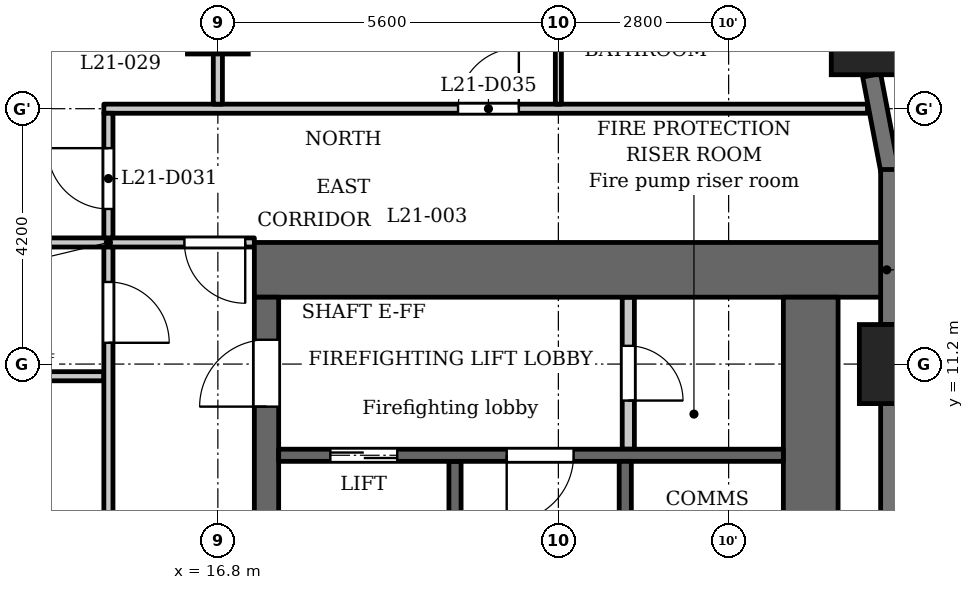
"""IFC4 building model, lengths in metres.
Left out: names, types, materials, properties, quantities, classifications, styles, units other than length and angle.
Written with IfcOpenShell. Run it as: python <this file> out.ifc"""

import sys

from ifc_helpers import new_model, si_unit, direction, frame, frame_2d, origin, origin_2d, place, context, subcontext, project, spatial, rectangle, extrude, element, fill, save


model = new_model("IFC4")
c1 = context("Model", 3, precision=1e-05, world=origin(), true_north=direction((0.0, 1.0)))
c2 = subcontext(c1, "Body", "Model", "MODEL_VIEW")
j1 = project(units=[si_unit("LENGTHUNIT", "METRE"), si_unit("PLANEANGLEUNIT", "RADIAN")], contexts=[c1])
p1 = place(None, origin())
s1 = spatial("IfcSite", under=j1, at=p1, CompositionType="ELEMENT")
p2 = place(p1, origin())
s2 = spatial("IfcBuilding", under=s1, at=p2, CompositionType="ELEMENT")
p3 = place(p2, frame((0.0, 0.0, 86.8)))
s3 = spatial("IfcBuildingStorey", under=s2, at=p3, CompositionType="ELEMENT", Elevation=86.8)
for number, where, z_axis, x_axis in (
    (1, (28.0, 11.2, 0.0), (0.0, 0.0, 1.0), (1.0, 0.0, 0.0)),
    (2, (27.538, 16.609, 0.0), (0.0, 0.0, 1.0), (1.0, 0.0, 0.0)),
):
    element("IfcColumn", number, at=place(p3, frame(where, z_axis=z_axis, x_axis=x_axis)), inside=s3, PredefinedType="COLUMN", context=c2, shape_type="SweptSolid", body=[
        extrude(rectangle(XDim=1.3, YDim=1.3, at=origin_2d()), origin(), (0.0, 0.0, 1.0), 3.5),
    ])
p4 = place(p3, frame((16.8, 16.8, 0.0), z_axis=(0.0, 0.0, 1.0), x_axis=(1.0, 0.0, 0.0)))
e3 = element("IfcColumn", 3, at=p4, inside=s3, PredefinedType="COLUMN", context=c2, shape_type="SweptSolid", body=[
    extrude(rectangle(XDim=1.0, YDim=1.0, at=origin_2d()), origin(), (0.0, 0.0, 1.0), 3.5),
])
p5 = place(p3, frame((27.85, 6.25, 0.0), z_axis=(0.0, 0.0, 1.0), x_axis=(0.0, 1.0, 0.0)))
e4 = element("IfcWall", 4, at=p5, inside=s3, PredefinedType="SOLIDWALL", context=c2, shape_type="SweptSolid", body=[
    extrude(rectangle(XDim=4.3, YDim=0.3, at=frame_2d((2.15, 0.0))), origin(), (0.0, 0.0, 1.0), 2.4),
])
p6 = place(p3, frame((27.85, 11.85, 0.0), z_axis=(0.0, 0.0, 1.0), x_axis=(0.0, 1.0, 0.0)))
e5 = element("IfcWall", 5, at=p6, inside=s3, PredefinedType="SOLIDWALL", context=c2, shape_type="SweptSolid", body=[
    extrude(rectangle(XDim=2.55, YDim=0.3, at=frame_2d((1.275, 0.0))), origin(), (0.0, 0.0, 1.0), 2.4),
])
p7 = place(p3, frame((27.853, 14.372, 0.0), z_axis=(0.0, 0.0, 1.0), x_axis=(-0.187279751651, 0.982306619453, 0.0)))
e6 = element("IfcWall", 6, at=p7, inside=s3, PredefinedType="SOLIDWALL", context=c2, shape_type="SweptSolid", body=[
    extrude(rectangle(XDim=1.606, YDim=0.3, at=frame_2d((0.803, 0.0))), origin(), (0.0, 0.0, 1.0), 2.4),
])
p8 = place(p3, frame((20.7, 2.6, 0.0), z_axis=(0.0, 0.0, 1.0), x_axis=(0.0, 1.0, 0.0)))
e7 = element("IfcWall", 7, at=p8, inside=s3, PredefinedType="SHEAR", context=c2, shape_type="SweptSolid", body=[
    extrude(rectangle(XDim=7.0, YDim=0.2, at=frame_2d((3.5, 0.0))), origin(), (0.0, 0.0, 1.0), 3.2),
])
p9 = place(p3, frame((17.4, 12.75, 0.0), z_axis=(0.0, 0.0, 1.0), x_axis=(1.0, 0.0, 0.0)))
e8 = element("IfcWall", 8, at=p9, inside=s3, PredefinedType="SHEAR", context=c2, shape_type="SweptSolid", body=[
    extrude(rectangle(XDim=10.4, YDim=0.9, at=frame_2d((5.2, 0.0))), origin(), (0.0, 0.0, 1.0), 3.2),
])
p10 = place(p3, frame((17.6, -12.3, 0.0), z_axis=(0.0, 0.0, 1.0), x_axis=(0.0, 1.0, 0.0)))
e9 = element("IfcWall", 9, at=p10, inside=s3, PredefinedType="SHEAR", context=c2, shape_type="SweptSolid", body=[
    extrude(rectangle(XDim=24.6, YDim=0.4, at=frame_2d((12.3, 0.0))), origin(), (0.0, 0.0, 1.0), 3.2),
])
p11 = place(p10, frame((6.0, 0.0, 0.0)))
e10 = element("IfcOpeningElement", 10, at=p11, cuts=e9, PredefinedType="OPENING", context=c2, shape_type="SweptSolid", body=[
    extrude(rectangle(XDim=1.1, YDim=2.1, at=frame_2d((0.55, 1.05))), frame((0.0, 0.21, 0.0), z_axis=(0.0, -1.0, 0.0), x_axis=(1.0, 0.0, 0.0)), (0.0, 0.0, 1.0), 0.42),
])
p12 = place(p10, frame((8.4, 0.0, 0.0)))
e11 = element("IfcOpeningElement", 11, at=p12, cuts=e9, PredefinedType="OPENING", context=c2, shape_type="SweptSolid", body=[
    extrude(rectangle(XDim=1.1, YDim=2.1, at=frame_2d((0.55, 1.05))), frame((0.0, 0.21, 0.0), z_axis=(0.0, -1.0, 0.0), x_axis=(1.0, 0.0, 0.0)), (0.0, 0.0, 1.0), 0.42),
])
p13 = place(p10, frame((10.8, 0.0, 0.0)))
e12 = element("IfcOpeningElement", 12, at=p13, cuts=e9, PredefinedType="OPENING", context=c2, shape_type="SweptSolid", body=[
    extrude(rectangle(XDim=1.1, YDim=2.1, at=frame_2d((0.55, 1.05))), frame((0.0, 0.21, 0.0), z_axis=(0.0, -1.0, 0.0), x_axis=(1.0, 0.0, 0.0)), (0.0, 0.0, 1.0), 0.42),
])
p14 = place(p10, frame((16.75, 0.0, 0.0)))
e13 = element("IfcOpeningElement", 13, at=p14, cuts=e9, PredefinedType="OPENING", context=c2, shape_type="SweptSolid", body=[
    extrude(rectangle(XDim=0.9, YDim=2.1, at=frame_2d((0.45, 1.05))), frame((0.0, 0.21, 0.0), z_axis=(0.0, -1.0, 0.0), x_axis=(1.0, 0.0, 0.0)), (0.0, 0.0, 1.0), 0.42),
])
p15 = place(p10, frame((22.8, 0.0, 0.0)))
e14 = element("IfcOpeningElement", 14, at=p15, cuts=e9, PredefinedType="OPENING", context=c2, shape_type="SweptSolid", body=[
    extrude(rectangle(XDim=1.1, YDim=2.1, at=frame_2d((0.55, 1.05))), frame((0.0, 0.21, 0.0), z_axis=(0.0, -1.0, 0.0), x_axis=(1.0, 0.0, 0.0)), (0.0, 0.0, 1.0), 0.42),
])
p16 = place(p10, frame((0.7, 0.0, 0.0)))
e15 = element("IfcOpeningElement", 15, at=p16, cuts=e9, PredefinedType="OPENING", context=c2, shape_type="SweptSolid", body=[
    extrude(rectangle(XDim=1.1, YDim=2.1, at=frame_2d((0.55, 1.05))), frame((0.0, 0.21, 0.0), z_axis=(0.0, -1.0, 0.0), x_axis=(1.0, 0.0, 0.0)), (0.0, 0.0, 1.0), 0.42),
])
p17 = place(p10, frame((12.775, 0.0, 0.0)))
e16 = element("IfcOpeningElement", 16, at=p17, cuts=e9, PredefinedType="OPENING", context=c2, shape_type="SweptSolid", body=[
    extrude(rectangle(XDim=1.8, YDim=2.1, at=frame_2d((0.9, 1.05))), frame((0.0, 0.21, 0.0), z_axis=(0.0, -1.0, 0.0), x_axis=(1.0, 0.0, 0.0)), (0.0, 0.0, 1.0), 0.42),
])
p18 = place(p3, frame((26.55, -12.3, 0.0), z_axis=(0.0, 0.0, 1.0), x_axis=(0.0, 1.0, 0.0)))
e17 = element("IfcWall", 17, at=p18, inside=s3, PredefinedType="SHEAR", context=c2, shape_type="SweptSolid", body=[
    extrude(rectangle(XDim=24.6, YDim=0.9, at=frame_2d((12.3, 0.0))), origin(), (0.0, 0.0, 1.0), 3.2),
])
p19 = place(p3, frame((23.55, 9.8, 0.0), z_axis=(0.0, 0.0, 1.0), x_axis=(0.0, 1.0, 0.0)))
e18 = element("IfcWall", 18, at=p19, inside=s3, PredefinedType="PARTITIONING", context=c2, shape_type="SweptSolid", body=[
    extrude(rectangle(XDim=2.5, YDim=0.2, at=frame_2d((1.25, 0.0))), origin(), (0.0, 0.0, 1.0), 3.2),
])
p20 = place(p19, frame((0.8, 0.0, 0.0)))
e19 = element("IfcOpeningElement", 19, at=p20, cuts=e18, PredefinedType="OPENING", context=c2, shape_type="SweptSolid", body=[
    extrude(rectangle(XDim=0.9, YDim=2.1, at=frame_2d((0.45, 1.05))), frame((0.0, 0.11, 0.0), z_axis=(0.0, -1.0, 0.0), x_axis=(1.0, 0.0, 0.0)), (0.0, 0.0, 1.0), 0.22),
])
p21 = place(p3, frame((17.8, 9.7, 0.0), z_axis=(0.0, 0.0, 1.0), x_axis=(1.0, 0.0, 0.0)))
e20 = element("IfcWall", 20, at=p21, inside=s3, PredefinedType="SHEAR", context=c2, shape_type="SweptSolid", body=[
    extrude(rectangle(XDim=8.3, YDim=0.2, at=frame_2d((4.15, 0.0))), origin(), (0.0, 0.0, 1.0), 3.2),
])
p22 = place(p21, frame((0.85, 0.0, 0.0)))
e21 = element("IfcOpeningElement", 21, at=p22, cuts=e20, PredefinedType="OPENING", context=c2, shape_type="SweptSolid", body=[
    extrude(rectangle(XDim=1.1, YDim=2.1, at=frame_2d((0.55, 1.05))), frame((0.0, 0.11, 0.0), z_axis=(0.0, -1.0, 0.0), x_axis=(1.0, 0.0, 0.0)), (0.0, 0.0, 1.0), 0.22),
])
p23 = place(p21, frame((3.75, 0.0, 0.0)))
e22 = element("IfcOpeningElement", 22, at=p23, cuts=e20, PredefinedType="OPENING", context=c2, shape_type="SweptSolid", body=[
    extrude(rectangle(XDim=1.1, YDim=2.1, at=frame_2d((0.55, 1.05))), frame((0.0, 0.11, 0.0), z_axis=(0.0, -1.0, 0.0), x_axis=(1.0, 0.0, 0.0)), (0.0, 0.0, 1.0), 0.22),
])
p24 = place(p3, frame((23.5, 2.6, 0.0), z_axis=(0.0, 0.0, 1.0), x_axis=(0.0, 1.0, 0.0)))
e23 = element("IfcWall", 23, at=p24, inside=s3, PredefinedType="SHEAR", context=c2, shape_type="SweptSolid", body=[
    extrude(rectangle(XDim=7.0, YDim=0.2, at=frame_2d((3.5, 0.0))), origin(), (0.0, 0.0, 1.0), 3.2),
])
p25 = place(p3, frame((-14.925, 11.0, 0.0), z_axis=(0.0, 0.0, 1.0), x_axis=(1.0, 0.0, 0.0)))
e24 = element("IfcWall", 24, at=p25, inside=s3, PredefinedType="PARTITIONING", context=c2, shape_type="SweptSolid", body=[
    extrude(rectangle(XDim=29.85, YDim=0.15, at=frame_2d((14.925, 0.0))), origin(), (0.0, 0.0, 1.0), 3.2),
])
p26 = place(p25, frame((1.076, 0.0, 0.0)))
e25 = element("IfcOpeningElement", 25, at=p26, cuts=e24, PredefinedType="OPENING", context=c2, shape_type="SweptSolid", body=[
    extrude(rectangle(XDim=1.0, YDim=2.1, at=frame_2d((0.5, 1.05))), frame((0.0, 0.085, 0.0), z_axis=(0.0, -1.0, 0.0), x_axis=(1.0, 0.0, 0.0)), (0.0, 0.0, 1.0), 0.17),
])
p27 = place(p25, frame((7.625, 0.0, 0.0)))
e26 = element("IfcOpeningElement", 26, at=p27, cuts=e24, PredefinedType="OPENING", context=c2, shape_type="SweptSolid", body=[
    extrude(rectangle(XDim=1.0, YDim=2.1, at=frame_2d((0.5, 1.05))), frame((0.0, 0.085, 0.0), z_axis=(0.0, -1.0, 0.0), x_axis=(1.0, 0.0, 0.0)), (0.0, 0.0, 1.0), 0.17),
])
p28 = place(p25, frame((9.975, 0.0, 0.0)))
e27 = element("IfcOpeningElement", 27, at=p28, cuts=e24, PredefinedType="OPENING", context=c2, shape_type="SweptSolid", body=[
    extrude(rectangle(XDim=1.0, YDim=2.1, at=frame_2d((0.5, 1.05))), frame((0.0, 0.085, 0.0), z_axis=(0.0, -1.0, 0.0), x_axis=(1.0, 0.0, 0.0)), (0.0, 0.0, 1.0), 0.17),
])
p29 = place(p25, frame((18.825, 0.0, 0.0)))
e28 = element("IfcOpeningElement", 28, at=p29, cuts=e24, PredefinedType="OPENING", context=c2, shape_type="SweptSolid", body=[
    extrude(rectangle(XDim=1.0, YDim=2.1, at=frame_2d((0.5, 1.05))), frame((0.0, 0.085, 0.0), z_axis=(0.0, -1.0, 0.0), x_axis=(1.0, 0.0, 0.0)), (0.0, 0.0, 1.0), 0.17),
])
p30 = place(p25, frame((21.175, 0.0, 0.0)))
e29 = element("IfcOpeningElement", 29, at=p30, cuts=e24, PredefinedType="OPENING", context=c2, shape_type="SweptSolid", body=[
    extrude(rectangle(XDim=1.0, YDim=2.1, at=frame_2d((0.5, 1.05))), frame((0.0, 0.085, 0.0), z_axis=(0.0, -1.0, 0.0), x_axis=(1.0, 0.0, 0.0)), (0.0, 0.0, 1.0), 0.17),
])
p31 = place(p25, frame((27.775, 0.0, 0.0)))
e30 = element("IfcOpeningElement", 30, at=p31, cuts=e24, PredefinedType="OPENING", context=c2, shape_type="SweptSolid", body=[
    extrude(rectangle(XDim=1.0, YDim=2.1, at=frame_2d((0.5, 1.05))), frame((0.0, 0.085, 0.0), z_axis=(0.0, -1.0, 0.0), x_axis=(1.0, 0.0, 0.0)), (0.0, 0.0, 1.0), 0.17),
])
p32 = place(p3, frame((-17.4, 13.2, 0.0), z_axis=(0.0, 0.0, 1.0), x_axis=(1.0, 0.0, 0.0)))
e31 = element("IfcWall", 31, at=p32, inside=s3, PredefinedType="PARTITIONING", context=c2, shape_type="SweptSolid", body=[
    extrude(rectangle(XDim=34.8, YDim=0.15, at=frame_2d((17.4, 0.0))), origin(), (0.0, 0.0, 1.0), 3.2),
])
p33 = place(p32, frame((0.25, 0.0, 0.0)))
e32 = element("IfcOpeningElement", 32, at=p33, cuts=e31, PredefinedType="OPENING", context=c2, shape_type="SweptSolid", body=[
    extrude(rectangle(XDim=1.0, YDim=2.1, at=frame_2d((0.5, 1.05))), frame((0.0, 0.085, 0.0), z_axis=(0.0, -1.0, 0.0), x_axis=(1.0, 0.0, 0.0)), (0.0, 0.0, 1.0), 0.17),
])
p34 = place(p32, frame((33.65, 0.0, 0.0)))
e33 = element("IfcOpeningElement", 33, at=p34, cuts=e31, PredefinedType="OPENING", context=c2, shape_type="SweptSolid", body=[
    extrude(rectangle(XDim=1.0, YDim=2.1, at=frame_2d((0.5, 1.05))), frame((0.0, 0.085, 0.0), z_axis=(0.0, -1.0, 0.0), x_axis=(1.0, 0.0, 0.0)), (0.0, 0.0, 1.0), 0.17),
])
p35 = place(p32, frame((15.75, 0.0, 0.0)))
e34 = element("IfcOpeningElement", 34, at=p35, cuts=e31, PredefinedType="OPENING", context=c2, shape_type="SweptSolid", body=[
    extrude(rectangle(XDim=1.0, YDim=2.1, at=frame_2d((0.5, 1.05))), frame((0.0, 0.085, 0.0), z_axis=(0.0, -1.0, 0.0), x_axis=(1.0, 0.0, 0.0)), (0.0, 0.0, 1.0), 0.17),
])
p36 = place(p32, frame((21.35, 0.0, 0.0)))
e35 = element("IfcOpeningElement", 35, at=p36, cuts=e31, PredefinedType="OPENING", context=c2, shape_type="SweptSolid", body=[
    extrude(rectangle(XDim=1.0, YDim=2.1, at=frame_2d((0.5, 1.05))), frame((0.0, 0.085, 0.0), z_axis=(0.0, -1.0, 0.0), x_axis=(1.0, 0.0, 0.0)), (0.0, 0.0, 1.0), 0.17),
])
p37 = place(p3, frame((14.925, 15.4, 0.0), z_axis=(0.0, 0.0, 1.0), x_axis=(1.0, 0.0, 0.0)))
e36 = element("IfcWall", 36, at=p37, inside=s3, PredefinedType="PARTITIONING", context=c2, shape_type="SweptSolid", body=[
    extrude(rectangle(XDim=12.559, YDim=0.15, at=frame_2d((6.279, 0.0))), origin(), (0.0, 0.0, 1.0), 3.2),
])
p38 = place(p37, frame((5.825, 0.0, 0.0)))
e37 = element("IfcOpeningElement", 37, at=p38, cuts=e36, PredefinedType="OPENING", context=c2, shape_type="SweptSolid", body=[
    extrude(rectangle(XDim=1.0, YDim=2.1, at=frame_2d((0.5, 1.05))), frame((0.0, 0.085, 0.0), z_axis=(0.0, -1.0, 0.0), x_axis=(1.0, 0.0, 0.0)), (0.0, 0.0, 1.0), 0.17),
])
p39 = place(p3, frame((15.0, 6.769, 0.0), z_axis=(0.0, 0.0, 1.0), x_axis=(0.0, 1.0, 0.0)))
e38 = element("IfcWall", 38, at=p39, inside=s3, PredefinedType="PARTITIONING", context=c2, shape_type="SweptSolid", body=[
    extrude(rectangle(XDim=6.356, YDim=0.15, at=frame_2d((3.178, 0.0))), origin(), (0.0, 0.0, 1.0), 3.2),
])
p40 = place(p39, frame((4.781, 0.0, 0.0)))
e39 = element("IfcOpeningElement", 39, at=p40, cuts=e38, PredefinedType="OPENING", context=c2, shape_type="SweptSolid", body=[
    extrude(rectangle(XDim=1.0, YDim=2.1, at=frame_2d((0.5, 1.05))), frame((0.0, 0.085, 0.0), z_axis=(0.0, -1.0, 0.0), x_axis=(1.0, 0.0, 0.0)), (0.0, 0.0, 1.0), 0.17),
])
p41 = place(p3, frame((15.0, 13.275, 0.0), z_axis=(0.0, 0.0, 1.0), x_axis=(0.0, 1.0, 0.0)))
e40 = element("IfcWall", 40, at=p41, inside=s3, PredefinedType="PARTITIONING", context=c2, shape_type="SweptSolid", body=[
    extrude(rectangle(XDim=2.05, YDim=0.15, at=frame_2d((1.025, 0.0))), origin(), (0.0, 0.0, 1.0), 3.2),
])
p42 = place(p41, frame((0.476, 0.0, 0.0)))
e41 = element("IfcOpeningElement", 41, at=p42, cuts=e40, PredefinedType="OPENING", context=c2, shape_type="SweptSolid", body=[
    extrude(rectangle(XDim=1.0, YDim=2.1, at=frame_2d((0.5, 1.05))), frame((0.0, 0.085, 0.0), z_axis=(0.0, -1.0, 0.0), x_axis=(1.0, 0.0, 0.0)), (0.0, 0.0, 1.0), 0.17),
])
p43 = place(p3, frame((16.8, 15.475, 0.0), z_axis=(0.0, 0.0, 1.0), x_axis=(0.0, 1.0, 0.0)))
e42 = element("IfcWall", 42, at=p43, inside=s3, PredefinedType="PARTITIONING", context=c2, shape_type="SweptSolid", body=[
    extrude(rectangle(XDim=7.555, YDim=0.15, at=frame_2d((3.777, 0.0))), origin(), (0.0, 0.0, 1.0), 3.2),
])
p44 = place(p3, frame((22.4, 15.475, 0.0), z_axis=(0.0, 0.0, 1.0), x_axis=(0.0, 1.0, 0.0)))
e43 = element("IfcWall", 43, at=p44, inside=s3, PredefinedType="PARTITIONING", context=c2, shape_type="SweptSolid", body=[
    extrude(rectangle(XDim=2.575, YDim=0.1, at=frame_2d((1.288, 0.0))), origin(), (0.0, 0.0, 1.0), 3.2),
])
p45 = place(p22, origin())
e44 = element("IfcDoor", 44, at=p45, inside=s3, OperationType="DOUBLE_DOOR_SLIDING", PredefinedType="DOOR", context=c2, shape_type="SweptSolid", body=[
    extrude(rectangle(XDim=1.1, YDim=2.1, at=frame_2d((0.55, 1.05))), frame((0.0, 0.025, 0.0), z_axis=(0.0, -1.0, 0.0), x_axis=(1.0, 0.0, 0.0)), (0.0, 0.0, 1.0), 0.05),
])
fill(e21, e44)
p46 = place(p15, origin())
e45 = element("IfcDoor", 45, at=p46, inside=s3, OperationType="SINGLE_SWING_RIGHT", PredefinedType="DOOR", context=c2, shape_type="SweptSolid", body=[
    extrude(rectangle(XDim=1.1, YDim=2.1, at=frame_2d((0.55, 1.05))), frame((0.0, 0.025, 0.0), z_axis=(0.0, -1.0, 0.0), x_axis=(1.0, 0.0, 0.0)), (0.0, 0.0, 1.0), 0.05),
])
fill(e14, e45)
p47 = place(p20, origin())
e46 = element("IfcDoor", 46, at=p47, inside=s3, OperationType="SINGLE_SWING_LEFT", PredefinedType="DOOR", context=c2, shape_type="SweptSolid", body=[
    extrude(rectangle(XDim=0.9, YDim=2.1, at=frame_2d((0.45, 1.05))), frame((0.0, 0.025, 0.0), z_axis=(0.0, -1.0, 0.0), x_axis=(1.0, 0.0, 0.0)), (0.0, 0.0, 1.0), 0.05),
])
fill(e19, e46)
p48 = place(p23, origin())
e47 = element("IfcDoor", 47, at=p48, inside=s3, OperationType="SINGLE_SWING_LEFT", PredefinedType="DOOR", context=c2, shape_type="SweptSolid", body=[
    extrude(rectangle(XDim=1.1, YDim=2.1, at=frame_2d((0.55, 1.05))), frame((0.0, 0.025, 0.0), z_axis=(0.0, -1.0, 0.0), x_axis=(1.0, 0.0, 0.0)), (0.0, 0.0, 1.0), 0.05),
])
fill(e22, e47)
p49 = place(p40, origin())
e48 = element("IfcDoor", 48, at=p49, inside=s3, OperationType="SINGLE_SWING_LEFT", PredefinedType="DOOR", context=c2, shape_type="SweptSolid", body=[
    extrude(rectangle(XDim=1.0, YDim=2.1, at=frame_2d((0.5, 1.05))), frame((0.0, 0.025, 0.0), z_axis=(0.0, -1.0, 0.0), x_axis=(1.0, 0.0, 0.0)), (0.0, 0.0, 1.0), 0.05),
])
fill(e39, e48)
p50 = place(p34, origin())
e49 = element("IfcDoor", 49, at=p50, inside=s3, OperationType="SINGLE_SWING_RIGHT", PredefinedType="DOOR", context=c2, shape_type="SweptSolid", body=[
    extrude(rectangle(XDim=1.0, YDim=2.1, at=frame_2d((0.5, 1.05))), frame((0.0, 0.025, 0.0), z_axis=(0.0, -1.0, 0.0), x_axis=(1.0, 0.0, 0.0)), (0.0, 0.0, 1.0), 0.05),
])
fill(e33, e49)
p51 = place(p42, origin())
e50 = element("IfcDoor", 50, at=p51, inside=s3, OperationType="SINGLE_SWING_LEFT", PredefinedType="DOOR", context=c2, shape_type="SweptSolid", body=[
    extrude(rectangle(XDim=1.0, YDim=2.1, at=frame_2d((0.5, 1.05))), frame((0.0, 0.025, 0.0), z_axis=(0.0, -1.0, 0.0), x_axis=(1.0, 0.0, 0.0)), (0.0, 0.0, 1.0), 0.05),
])
fill(e41, e50)
p52 = place(p38, origin())
e51 = element("IfcDoor", 51, at=p52, inside=s3, OperationType="SINGLE_SWING_LEFT", PredefinedType="DOOR", context=c2, shape_type="SweptSolid", body=[
    extrude(rectangle(XDim=1.0, YDim=2.1, at=frame_2d((0.5, 1.05))), frame((0.0, 0.025, 0.0), z_axis=(0.0, -1.0, 0.0), x_axis=(1.0, 0.0, 0.0)), (0.0, 0.0, 1.0), 0.05),
])
fill(e37, e51)
save(model, sys.argv[1])
